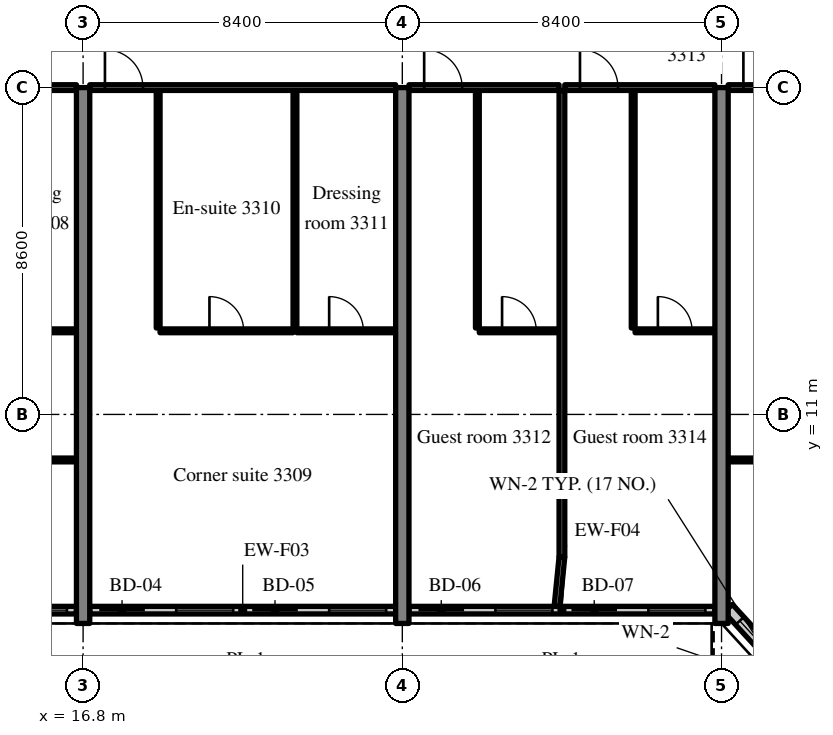
"""IFC4 building model, lengths in metres.
Left out: names, types, materials, properties, quantities, classifications, styles, units other than length and angle.
Written with IfcOpenShell. Run it as: python <this file> out.ifc"""

import sys

from ifc_helpers import new_model, si_unit, direction, frame, frame_2d, origin, place, context, subcontext, project, spatial, rectangle, extrude, source, transform, mapped, element, fill, save


model = new_model("IFC4")
c1 = context("Model", 3, precision=1e-05, world=origin(), true_north=direction((0.0, 1.0)))
c2 = subcontext(c1, "Body", "Model", "MODEL_VIEW")
j1 = project(units=[si_unit("LENGTHUNIT", "METRE"), si_unit("PLANEANGLEUNIT", "RADIAN")], contexts=[c1])
p1 = place(None, origin())
s1 = spatial("IfcSite", under=j1, at=p1, CompositionType="ELEMENT")
p2 = place(p1, origin())
s2 = spatial("IfcBuilding", under=s1, at=p2, CompositionType="ELEMENT")
p3 = place(p2, frame((0.0, 0.0, 137.0)))
s3 = spatial("IfcBuildingStorey", under=s2, at=p3, CompositionType="ELEMENT", Elevation=137.0)
m1 = source(origin(), c2, "Body", "SweptSolid", [
    extrude(rectangle(XDim=14.1, YDim=0.35, at=frame_2d((7.05, 0.0))), origin(), (0.0, 0.0, 1.0), 3.52),
])
for number, where, z_axis, x_axis in (
    (1, (16.8, 5.5, 0.0), (0.0, 0.0, 1.0), (0.0, 1.0, 0.0)),
    (2, (25.2, 5.5, 0.0), (0.0, 0.0, 1.0), (0.0, 1.0, 0.0)),
    (3, (33.6, 5.5, 0.0), (0.0, 0.0, 1.0), (0.0, 1.0, 0.0)),
):
    element("IfcWall", number, at=place(p3, frame(where, z_axis=z_axis, x_axis=x_axis)), inside=s3, PredefinedType="SHEAR", context=c2, shape_type="MappedRepresentation", body=[
        mapped(m1, transform((0.0, 0.0, 0.0), scale=1.0)),
    ])
m2 = source(origin(), c2, "Body", "SweptSolid", [
    extrude(rectangle(XDim=8.05, YDim=0.2, at=frame_2d((4.025, 0.0))), origin(), (0.0, 0.0, 1.0), 2.82),
])
p4 = place(p3, frame((8.575, 5.85, 0.0), z_axis=(0.0, 0.0, 1.0), x_axis=(1.0, 0.0, 0.0)))
e4 = element("IfcWall", 4, at=p4, inside=s3, PredefinedType="SOLIDWALL", context=c2, shape_type="MappedRepresentation", body=[
    mapped(m2, transform((0.0, 0.0, 0.0), scale=1.0)),
])
m3 = source(origin(), c2, "Body", "SweptSolid", [
    extrude(rectangle(XDim=1.2, YDim=2.4, at=frame_2d((0.6, 1.2))), frame((0.0, 0.11, 0.0), z_axis=(0.0, -1.0, 0.0), x_axis=(1.0, 0.0, 0.0)), (0.0, 0.0, 1.0), 0.22),
])
p5 = place(p4, frame((0.25, 0.0, 0.0)))
e5 = element("IfcOpeningElement", 5, at=p5, cuts=e4, PredefinedType="OPENING", context=c2, shape_type="MappedRepresentation", body=[
    mapped(m3, transform((0.0, 0.0, 0.0), scale=1.0)),
])
m4 = source(origin(), c2, "Body", "SweptSolid", [
    extrude(rectangle(XDim=1.5, YDim=1.5, at=frame_2d((0.75, 0.75))), frame((0.0, 0.11, 0.0), z_axis=(0.0, -1.0, 0.0), x_axis=(1.0, 0.0, 0.0)), (0.0, 0.0, 1.0), 0.22),
])
p6 = place(p4, frame((2.275, 0.0, 0.9)))
e6 = element("IfcOpeningElement", 6, at=p6, cuts=e4, PredefinedType="OPENING", context=c2, shape_type="MappedRepresentation", body=[
    mapped(m4, transform((0.0, 0.0, 0.0), scale=1.0)),
])
p7 = place(p4, frame((4.275, 0.0, 0.0)))
e7 = element("IfcOpeningElement", 7, at=p7, cuts=e4, PredefinedType="OPENING", context=c2, shape_type="MappedRepresentation", body=[
    mapped(m3, transform((0.0, 0.0, 0.0), scale=1.0)),
])
p8 = place(p4, frame((6.3, 0.0, 0.9)))
e8 = element("IfcOpeningElement", 8, at=p8, cuts=e4, PredefinedType="OPENING", context=c2, shape_type="MappedRepresentation", body=[
    mapped(m4, transform((0.0, 0.0, 0.0), scale=1.0)),
])
m5 = source(origin(), c2, "Body", "SweptSolid", [
    extrude(rectangle(XDim=8.05, YDim=0.2, at=frame_2d((4.025, 0.0))), origin(), (0.0, 0.0, 1.0), 2.82),
])
p9 = place(p3, frame((16.975, 5.85, 0.0), z_axis=(0.0, 0.0, 1.0), x_axis=(1.0, 0.0, 0.0)))
e9 = element("IfcWall", 9, at=p9, inside=s3, PredefinedType="SOLIDWALL", context=c2, shape_type="MappedRepresentation", body=[
    mapped(m5, transform((0.0, 0.0, 0.0), scale=1.0)),
])
p10 = place(p9, frame((0.25, 0.0, 0.0)))
e10 = element("IfcOpeningElement", 10, at=p10, cuts=e9, PredefinedType="OPENING", context=c2, shape_type="MappedRepresentation", body=[
    mapped(m3, transform((0.0, 0.0, 0.0), scale=1.0)),
])
p11 = place(p9, frame((2.275, 0.0, 0.9)))
e11 = element("IfcOpeningElement", 11, at=p11, cuts=e9, PredefinedType="OPENING", context=c2, shape_type="MappedRepresentation", body=[
    mapped(m4, transform((0.0, 0.0, 0.0), scale=1.0)),
])
p12 = place(p9, frame((4.275, 0.0, 0.0)))
e12 = element("IfcOpeningElement", 12, at=p12, cuts=e9, PredefinedType="OPENING", context=c2, shape_type="MappedRepresentation", body=[
    mapped(m3, transform((0.0, 0.0, 0.0), scale=1.0)),
])
p13 = place(p9, frame((6.3, 0.0, 0.9)))
e13 = element("IfcOpeningElement", 13, at=p13, cuts=e9, PredefinedType="OPENING", context=c2, shape_type="MappedRepresentation", body=[
    mapped(m4, transform((0.0, 0.0, 0.0), scale=1.0)),
])
p14 = place(p3, frame((25.375, 5.85, 0.0), z_axis=(0.0, 0.0, 1.0), x_axis=(1.0, 0.0, 0.0)))
e14 = element("IfcWall", 14, at=p14, inside=s3, PredefinedType="SOLIDWALL", context=c2, shape_type="MappedRepresentation", body=[
    mapped(m2, transform((0.0, 0.0, 0.0), scale=1.0)),
])
p15 = place(p14, frame((0.25, 0.0, 0.0)))
e15 = element("IfcOpeningElement", 15, at=p15, cuts=e14, PredefinedType="OPENING", context=c2, shape_type="MappedRepresentation", body=[
    mapped(m3, transform((0.0, 0.0, 0.0), scale=1.0)),
])
p16 = place(p14, frame((2.275, 0.0, 0.9)))
e16 = element("IfcOpeningElement", 16, at=p16, cuts=e14, PredefinedType="OPENING", context=c2, shape_type="MappedRepresentation", body=[
    mapped(m4, transform((0.0, 0.0, 0.0), scale=1.0)),
])
p17 = place(p14, frame((4.275, 0.0, 0.0)))
e17 = element("IfcOpeningElement", 17, at=p17, cuts=e14, PredefinedType="OPENING", context=c2, shape_type="MappedRepresentation", body=[
    mapped(m3, transform((0.0, 0.0, 0.0), scale=1.0)),
])
p18 = place(p14, frame((6.3, 0.0, 0.9)))
e18 = element("IfcOpeningElement", 18, at=p18, cuts=e14, PredefinedType="OPENING", context=c2, shape_type="MappedRepresentation", body=[
    mapped(m4, transform((0.0, 0.0, 0.0), scale=1.0)),
])
m6 = source(origin(), c2, "Body", "SweptSolid", [
    extrude(rectangle(XDim=2.398, YDim=0.3, at=frame_2d((1.199, 0.0))), origin(), (0.0, 0.0, 1.0), 3.52),
])
p19 = place(p3, frame((33.776, 5.9, 0.0), z_axis=(0.0, 0.0, 1.0), x_axis=(0.675374189419, -0.737475222815, 0.0)))
e19 = element("IfcWall", 19, at=p19, inside=s3, PredefinedType="SOLIDWALL", context=c2, shape_type="MappedRepresentation", body=[
    mapped(m6, transform((0.0, 0.0, 0.0), scale=1.0)),
])
m7 = source(origin(), c2, "Body", "SweptSolid", [
    extrude(rectangle(XDim=1.5, YDim=2.0, at=frame_2d((0.75, 1.0))), frame((0.0, 0.16, 0.0), z_axis=(0.0, -1.0, 0.0), x_axis=(1.0, 0.0, 0.0)), (0.0, 0.0, 1.0), 0.32),
])
p20 = place(p19, frame((0.449, 0.0, 0.9)))
e20 = element("IfcOpeningElement", 20, at=p20, cuts=e19, PredefinedType="OPENING", context=c2, shape_type="MappedRepresentation", body=[
    mapped(m7, transform((0.0, 0.0, 0.0), scale=1.0)),
])
m8 = source(origin(), c2, "Body", "SweptSolid", [
    extrude(rectangle(XDim=2.6, YDim=0.1, at=frame_2d((1.3, 0.0))), origin(), (0.0, 0.0, 1.0), 3.52),
])
p21 = place(p3, frame((14.025, 13.2, 0.0), z_axis=(0.0, 0.0, 1.0), x_axis=(1.0, 0.0, 0.0)))
e21 = element("IfcWall", 21, at=p21, inside=s3, PredefinedType="PARTITIONING", context=c2, shape_type="MappedRepresentation", body=[
    mapped(m8, transform((0.0, 0.0, 0.0), scale=1.0)),
])
m9 = source(origin(), c2, "Body", "SweptSolid", [
    extrude(rectangle(XDim=0.9, YDim=2.1, at=frame_2d((0.45, 1.05))), frame((0.0, 0.06, 0.0), z_axis=(0.0, -1.0, 0.0), x_axis=(1.0, 0.0, 0.0)), (0.0, 0.0, 1.0), 0.12),
])
p22 = place(p21, frame((0.85, 0.0, 0.0)))
e22 = element("IfcOpeningElement", 22, at=p22, cuts=e21, PredefinedType="OPENING", context=c2, shape_type="MappedRepresentation", body=[
    mapped(m9, transform((0.0, 0.0, 0.0), scale=1.0)),
])
m10 = source(origin(), c2, "Body", "SweptSolid", [
    extrude(rectangle(XDim=8.05, YDim=0.1, at=frame_2d((4.025, 0.0))), origin(), (0.0, 0.0, 1.0), 3.52),
])
p23 = place(p3, frame((8.575, 9.802, 0.0), z_axis=(0.0, 0.0, 1.0), x_axis=(1.0, 0.0, 0.0)))
e23 = element("IfcWall", 23, at=p23, inside=s3, PredefinedType="PARTITIONING", context=c2, shape_type="MappedRepresentation", body=[
    mapped(m10, transform((0.0, 0.0, 0.0), scale=1.0)),
])
m11 = source(origin(), c2, "Body", "SweptSolid", [
    extrude(rectangle(XDim=1.8, YDim=2.1, at=frame_2d((0.9, 1.05))), frame((0.0, 0.06, 0.0), z_axis=(0.0, -1.0, 0.0), x_axis=(1.0, 0.0, 0.0)), (0.0, 0.0, 1.0), 0.12),
])
p24 = place(p23, frame((3.125, 0.0, 0.0)))
e24 = element("IfcOpeningElement", 24, at=p24, cuts=e23, PredefinedType="OPENING", context=c2, shape_type="MappedRepresentation", body=[
    mapped(m11, transform((0.0, 0.0, 0.0), scale=1.0)),
])
m12 = source(origin(), c2, "Body", "SweptSolid", [
    extrude(rectangle(XDim=8.05, YDim=0.15, at=frame_2d((4.025, 0.0))), origin(), (0.0, 0.0, 1.0), 2.82),
])
p25 = place(p3, frame((8.575, 19.6, 0.0), z_axis=(0.0, 0.0, 1.0), x_axis=(1.0, 0.0, 0.0)))
e25 = element("IfcWall", 25, at=p25, inside=s3, PredefinedType="PARTITIONING", context=c2, shape_type="MappedRepresentation", body=[
    mapped(m12, transform((0.0, 0.0, 0.0), scale=1.0)),
])
m13 = source(origin(), c2, "Body", "SweptSolid", [
    extrude(rectangle(XDim=1.0, YDim=2.1, at=frame_2d((0.5, 1.05))), frame((0.0, 0.085, 0.0), z_axis=(0.0, -1.0, 0.0), x_axis=(1.0, 0.0, 0.0)), (0.0, 0.0, 1.0), 0.17),
])
p26 = place(p25, frame((0.4, 0.0, 0.0)))
e26 = element("IfcOpeningElement", 26, at=p26, cuts=e25, PredefinedType="OPENING", context=c2, shape_type="MappedRepresentation", body=[
    mapped(m13, transform((0.0, 0.0, 0.0), scale=1.0)),
])
m14 = source(origin(), c2, "Body", "SweptSolid", [
    extrude(rectangle(XDim=6.25, YDim=0.1, at=frame_2d((3.125, 0.0))), origin(), (0.0, 0.0, 1.0), 3.52),
])
for number, where, z_axis, x_axis in (
    (27, (18.775, 13.275, 0.0), (0.0, 0.0, 1.0), (0.0, 1.0, 0.0)),
    (28, (22.375, 13.275, 0.0), (0.0, 0.0, 1.0), (0.0, 1.0, 0.0)),
):
    element("IfcWall", number, at=place(p3, frame(where, z_axis=z_axis, x_axis=x_axis)), inside=s3, PredefinedType="PARTITIONING", context=c2, shape_type="MappedRepresentation", body=[
        mapped(m14, transform((0.0, 0.0, 0.0), scale=1.0)),
    ])
m15 = source(origin(), c2, "Body", "SweptSolid", [
    extrude(rectangle(XDim=3.5, YDim=0.1, at=frame_2d((1.75, 0.0))), origin(), (0.0, 0.0, 1.0), 3.52),
])
p27 = place(p3, frame((18.825, 13.2, 0.0), z_axis=(0.0, 0.0, 1.0), x_axis=(1.0, 0.0, 0.0)))
e29 = element("IfcWall", 29, at=p27, inside=s3, PredefinedType="PARTITIONING", context=c2, shape_type="MappedRepresentation", body=[
    mapped(m15, transform((0.0, 0.0, 0.0), scale=1.0)),
])
p28 = place(p27, frame((1.3, 0.0, 0.0)))
e30 = element("IfcOpeningElement", 30, at=p28, cuts=e29, PredefinedType="OPENING", context=c2, shape_type="MappedRepresentation", body=[
    mapped(m9, transform((0.0, 0.0, 0.0), scale=1.0)),
])
m16 = source(origin(), c2, "Body", "SweptSolid", [
    extrude(rectangle(XDim=2.6, YDim=0.1, at=frame_2d((1.3, 0.0))), origin(), (0.0, 0.0, 1.0), 3.52),
])
p29 = place(p3, frame((22.425, 13.2, 0.0), z_axis=(0.0, 0.0, 1.0), x_axis=(1.0, 0.0, 0.0)))
e31 = element("IfcWall", 31, at=p29, inside=s3, PredefinedType="PARTITIONING", context=c2, shape_type="MappedRepresentation", body=[
    mapped(m16, transform((0.0, 0.0, 0.0), scale=1.0)),
])
p30 = place(p29, frame((0.85, 0.0, 0.0)))
e32 = element("IfcOpeningElement", 32, at=p30, cuts=e31, PredefinedType="OPENING", context=c2, shape_type="MappedRepresentation", body=[
    mapped(m9, transform((0.0, 0.0, 0.0), scale=1.0)),
])
m17 = source(origin(), c2, "Body", "SweptSolid", [
    extrude(rectangle(XDim=8.05, YDim=0.15, at=frame_2d((4.025, 0.0))), origin(), (0.0, 0.0, 1.0), 2.82),
])
p31 = place(p3, frame((16.975, 19.6, 0.0), z_axis=(0.0, 0.0, 1.0), x_axis=(1.0, 0.0, 0.0)))
e33 = element("IfcWall", 33, at=p31, inside=s3, PredefinedType="PARTITIONING", context=c2, shape_type="MappedRepresentation", body=[
    mapped(m17, transform((0.0, 0.0, 0.0), scale=1.0)),
])
p32 = place(p31, frame((0.4, 0.0, 0.0)))
e34 = element("IfcOpeningElement", 34, at=p32, cuts=e33, PredefinedType="OPENING", context=c2, shape_type="MappedRepresentation", body=[
    mapped(m13, transform((0.0, 0.0, 0.0), scale=1.0)),
])
p33 = place(p3, frame((27.175, 13.275, 0.0), z_axis=(0.0, 0.0, 1.0), x_axis=(0.0, 1.0, 0.0)))
e35 = element("IfcWall", 35, at=p33, inside=s3, PredefinedType="PARTITIONING", context=c2, shape_type="MappedRepresentation", body=[
    mapped(m14, transform((0.0, 0.0, 0.0), scale=1.0)),
])
m18 = source(origin(), c2, "Body", "SweptSolid", [
    extrude(rectangle(XDim=2.1, YDim=0.1, at=frame_2d((1.05, 0.0))), origin(), (0.0, 0.0, 1.0), 3.52),
])
p34 = place(p3, frame((27.225, 13.2, 0.0), z_axis=(0.0, 0.0, 1.0), x_axis=(1.0, 0.0, 0.0)))
e36 = element("IfcWall", 36, at=p34, inside=s3, PredefinedType="PARTITIONING", context=c2, shape_type="MappedRepresentation", body=[
    mapped(m18, transform((0.0, 0.0, 0.0), scale=1.0)),
])
p35 = place(p34, frame((0.6, 0.0, 0.0)))
e37 = element("IfcOpeningElement", 37, at=p35, cuts=e36, PredefinedType="OPENING", context=c2, shape_type="MappedRepresentation", body=[
    mapped(m9, transform((0.0, 0.0, 0.0), scale=1.0)),
])
m19 = source(origin(), c2, "Body", "SweptSolid", [
    extrude(rectangle(XDim=3.95, YDim=0.15, at=frame_2d((1.975, 0.0))), origin(), (0.0, 0.0, 1.0), 2.82),
])
p36 = place(p3, frame((25.375, 19.6, 0.0), z_axis=(0.0, 0.0, 1.0), x_axis=(1.0, 0.0, 0.0)))
e38 = element("IfcWall", 38, at=p36, inside=s3, PredefinedType="PARTITIONING", context=c2, shape_type="MappedRepresentation", body=[
    mapped(m19, transform((0.0, 0.0, 0.0), scale=1.0)),
])
p37 = place(p36, frame((0.4, 0.0, 0.0)))
e39 = element("IfcOpeningElement", 39, at=p37, cuts=e38, PredefinedType="OPENING", context=c2, shape_type="MappedRepresentation", body=[
    mapped(m13, transform((0.0, 0.0, 0.0), scale=1.0)),
])
p38 = place(p3, frame((31.275, 13.275, 0.0), z_axis=(0.0, 0.0, 1.0), x_axis=(0.0, 1.0, 0.0)))
e40 = element("IfcWall", 40, at=p38, inside=s3, PredefinedType="PARTITIONING", context=c2, shape_type="MappedRepresentation", body=[
    mapped(m14, transform((0.0, 0.0, 0.0), scale=1.0)),
])
m20 = source(origin(), c2, "Body", "SweptSolid", [
    extrude(rectangle(XDim=2.1, YDim=0.1, at=frame_2d((1.05, 0.0))), origin(), (0.0, 0.0, 1.0), 3.52),
])
p39 = place(p3, frame((31.325, 13.2, 0.0), z_axis=(0.0, 0.0, 1.0), x_axis=(1.0, 0.0, 0.0)))
e41 = element("IfcWall", 41, at=p39, inside=s3, PredefinedType="PARTITIONING", context=c2, shape_type="MappedRepresentation", body=[
    mapped(m20, transform((0.0, 0.0, 0.0), scale=1.0)),
])
p40 = place(p39, frame((0.6, 0.0, 0.0)))
e42 = element("IfcOpeningElement", 42, at=p40, cuts=e41, PredefinedType="OPENING", context=c2, shape_type="MappedRepresentation", body=[
    mapped(m9, transform((0.0, 0.0, 0.0), scale=1.0)),
])
p41 = place(p3, frame((29.475, 19.6, 0.0), z_axis=(0.0, 0.0, 1.0), x_axis=(1.0, 0.0, 0.0)))
e43 = element("IfcWall", 43, at=p41, inside=s3, PredefinedType="PARTITIONING", context=c2, shape_type="MappedRepresentation", body=[
    mapped(m19, transform((0.0, 0.0, 0.0), scale=1.0)),
])
p42 = place(p41, frame((0.4, 0.0, 0.0)))
e44 = element("IfcOpeningElement", 44, at=p42, cuts=e43, PredefinedType="OPENING", context=c2, shape_type="MappedRepresentation", body=[
    mapped(m13, transform((0.0, 0.0, 0.0), scale=1.0)),
])
m21 = source(origin(), c2, "Body", "SweptSolid", [
    extrude(rectangle(XDim=12.275, YDim=0.15, at=frame_2d((6.137, 0.0))), origin(), (0.0, 0.0, 1.0), 3.52),
])
p43 = place(p3, frame((29.4, 7.25, 0.0), z_axis=(0.0, 0.0, 1.0), x_axis=(0.0, 1.0, 0.0)))
e45 = element("IfcWall", 45, at=p43, inside=s3, PredefinedType="PARTITIONING", context=c2, shape_type="MappedRepresentation", body=[
    mapped(m21, transform((0.0, 0.0, 0.0), scale=1.0)),
])
p44 = place(p3, frame((33.775, 9.802, 0.0), z_axis=(0.0, 0.0, 1.0), x_axis=(1.0, 0.0, 0.0)))
e46 = element("IfcWall", 46, at=p44, inside=s3, PredefinedType="PARTITIONING", context=c2, shape_type="MappedRepresentation", body=[
    mapped(m10, transform((0.0, 0.0, 0.0), scale=1.0)),
])
p45 = place(p44, frame((3.125, 0.0, 0.0)))
e47 = element("IfcOpeningElement", 47, at=p45, cuts=e46, PredefinedType="OPENING", context=c2, shape_type="MappedRepresentation", body=[
    mapped(m11, transform((0.0, 0.0, 0.0), scale=1.0)),
])
p46 = place(p3, frame((33.775, 19.6, 0.0), z_axis=(0.0, 0.0, 1.0), x_axis=(1.0, 0.0, 0.0)))
e48 = element("IfcWall", 48, at=p46, inside=s3, PredefinedType="PARTITIONING", context=c2, shape_type="MappedRepresentation", body=[
    mapped(m12, transform((0.0, 0.0, 0.0), scale=1.0)),
])
p47 = place(p46, frame((0.4, 0.0, 0.0)))
e49 = element("IfcOpeningElement", 49, at=p47, cuts=e48, PredefinedType="OPENING", context=c2, shape_type="MappedRepresentation", body=[
    mapped(m13, transform((0.0, 0.0, 0.0), scale=1.0)),
])
m22 = source(origin(), c2, "Body", "SweptSolid", [
    extrude(rectangle(XDim=1.307, YDim=0.15, at=frame_2d((0.653, 0.0))), origin(), (0.0, 0.0, 1.0), 3.52),
])
p48 = place(p3, frame((29.27, 5.95, 0.0), z_axis=(0.0, 0.0, 1.0), x_axis=(0.099411212066, 0.995046436562, 0.0)))
e50 = element("IfcWall", 50, at=p48, inside=s3, PredefinedType="PARTITIONING", context=c2, shape_type="MappedRepresentation", body=[
    mapped(m22, transform((0.0, 0.0, 0.0), scale=1.0)),
])
m23 = source(origin(), c2, "Body", "SweptSolid", [
    extrude(rectangle(XDim=1.5, YDim=1.5, at=frame_2d((0.75, 0.75))), frame((0.0, 0.03, 0.0), z_axis=(0.0, -1.0, 0.0), x_axis=(1.0, 0.0, 0.0)), (0.0, 0.0, 1.0), 0.06),
])
p49 = place(p8, origin())
e51 = element("IfcWindow", 51, at=p49, inside=s3, PartitioningType="SINGLE_PANEL", PredefinedType="WINDOW", context=c2, shape_type="MappedRepresentation", body=[
    mapped(m23, transform((0.0, 0.0, 0.0), scale=1.0)),
])
fill(e8, e51)
m24 = source(origin(), c2, "Body", "SweptSolid", [
    extrude(rectangle(XDim=1.2, YDim=2.4, at=frame_2d((0.6, 1.2))), frame((0.0, 0.025, 0.0), z_axis=(0.0, -1.0, 0.0), x_axis=(1.0, 0.0, 0.0)), (0.0, 0.0, 1.0), 0.05),
])
p50 = place(p10, origin())
e52 = element("IfcDoor", 52, at=p50, inside=s3, OperationType="SLIDING_TO_RIGHT", PredefinedType="DOOR", context=c2, shape_type="MappedRepresentation", body=[
    mapped(m24, transform((0.0, 0.0, 0.0), scale=1.0)),
])
fill(e10, e52)
p51 = place(p11, origin())
e53 = element("IfcWindow", 53, at=p51, inside=s3, PartitioningType="SINGLE_PANEL", PredefinedType="WINDOW", context=c2, shape_type="MappedRepresentation", body=[
    mapped(m23, transform((0.0, 0.0, 0.0), scale=1.0)),
])
fill(e11, e53)
p52 = place(p12, origin())
e54 = element("IfcDoor", 54, at=p52, inside=s3, OperationType="SLIDING_TO_LEFT", PredefinedType="DOOR", context=c2, shape_type="MappedRepresentation", body=[
    mapped(m24, transform((0.0, 0.0, 0.0), scale=1.0)),
])
fill(e12, e54)
p53 = place(p13, origin())
e55 = element("IfcWindow", 55, at=p53, inside=s3, PartitioningType="SINGLE_PANEL", PredefinedType="WINDOW", context=c2, shape_type="MappedRepresentation", body=[
    mapped(m23, transform((0.0, 0.0, 0.0), scale=1.0)),
])
fill(e13, e55)
p54 = place(p15, origin())
e56 = element("IfcDoor", 56, at=p54, inside=s3, OperationType="SLIDING_TO_RIGHT", PredefinedType="DOOR", context=c2, shape_type="MappedRepresentation", body=[
    mapped(m24, transform((0.0, 0.0, 0.0), scale=1.0)),
])
fill(e15, e56)
p55 = place(p16, origin())
e57 = element("IfcWindow", 57, at=p55, inside=s3, PartitioningType="SINGLE_PANEL", PredefinedType="WINDOW", context=c2, shape_type="MappedRepresentation", body=[
    mapped(m23, transform((0.0, 0.0, 0.0), scale=1.0)),
])
fill(e16, e57)
p56 = place(p17, origin())
e58 = element("IfcDoor", 58, at=p56, inside=s3, OperationType="SLIDING_TO_LEFT", PredefinedType="DOOR", context=c2, shape_type="MappedRepresentation", body=[
    mapped(m24, transform((0.0, 0.0, 0.0), scale=1.0)),
])
fill(e17, e58)
p57 = place(p18, origin())
e59 = element("IfcWindow", 59, at=p57, inside=s3, PartitioningType="SINGLE_PANEL", PredefinedType="WINDOW", context=c2, shape_type="MappedRepresentation", body=[
    mapped(m23, transform((0.0, 0.0, 0.0), scale=1.0)),
])
fill(e18, e59)
m25 = source(origin(), c2, "Body", "SweptSolid", [
    extrude(rectangle(XDim=1.5, YDim=2.0, at=frame_2d((0.75, 1.0))), frame((0.0, 0.03, 0.0), z_axis=(0.0, -1.0, 0.0), x_axis=(1.0, 0.0, 0.0)), (0.0, 0.0, 1.0), 0.06),
])
p58 = place(p20, origin())
e60 = element("IfcWindow", 60, at=p58, inside=s3, PartitioningType="SINGLE_PANEL", PredefinedType="WINDOW", context=c2, shape_type="MappedRepresentation", body=[
    mapped(m25, transform((0.0, 0.0, 0.0), scale=1.0)),
])
fill(e20, e60)
m26 = source(origin(), c2, "Body", "SweptSolid", [
    extrude(rectangle(XDim=0.9, YDim=2.1, at=frame_2d((0.45, 1.05))), frame((0.0, 0.025, 0.0), z_axis=(0.0, -1.0, 0.0), x_axis=(1.0, 0.0, 0.0)), (0.0, 0.0, 1.0), 0.05),
])
p59 = place(p28, origin())
e61 = element("IfcDoor", 61, at=p59, inside=s3, OperationType="SINGLE_SWING_LEFT", PredefinedType="DOOR", context=c2, shape_type="MappedRepresentation", body=[
    mapped(m26, transform((0.0, 0.0, 0.0), scale=1.0)),
])
fill(e30, e61)
p60 = place(p30, origin())
e62 = element("IfcDoor", 62, at=p60, inside=s3, OperationType="SINGLE_SWING_LEFT", PredefinedType="DOOR", context=c2, shape_type="MappedRepresentation", body=[
    mapped(m26, transform((0.0, 0.0, 0.0), scale=1.0)),
])
fill(e32, e62)
m27 = source(origin(), c2, "Body", "SweptSolid", [
    extrude(rectangle(XDim=1.0, YDim=2.1, at=frame_2d((0.5, 1.05))), frame((0.0, 0.025, 0.0), z_axis=(0.0, -1.0, 0.0), x_axis=(1.0, 0.0, 0.0)), (0.0, 0.0, 1.0), 0.05),
])
p61 = place(p32, origin())
e63 = element("IfcDoor", 63, at=p61, inside=s3, OperationType="SINGLE_SWING_LEFT", PredefinedType="DOOR", context=c2, shape_type="MappedRepresentation", body=[
    mapped(m27, transform((0.0, 0.0, 0.0), scale=1.0)),
])
fill(e34, e63)
p62 = place(p35, origin())
e64 = element("IfcDoor", 64, at=p62, inside=s3, OperationType="SINGLE_SWING_LEFT", PredefinedType="DOOR", context=c2, shape_type="MappedRepresentation", body=[
    mapped(m26, transform((0.0, 0.0, 0.0), scale=1.0)),
])
fill(e37, e64)
p63 = place(p37, origin())
e65 = element("IfcDoor", 65, at=p63, inside=s3, OperationType="SINGLE_SWING_LEFT", PredefinedType="DOOR", context=c2, shape_type="MappedRepresentation", body=[
    mapped(m27, transform((0.0, 0.0, 0.0), scale=1.0)),
])
fill(e39, e65)
p64 = place(p40, origin())
e66 = element("IfcDoor", 66, at=p64, inside=s3, OperationType="SINGLE_SWING_LEFT", PredefinedType="DOOR", context=c2, shape_type="MappedRepresentation", body=[
    mapped(m26, transform((0.0, 0.0, 0.0), scale=1.0)),
])
fill(e42, e66)
p65 = place(p42, origin())
e67 = element("IfcDoor", 67, at=p65, inside=s3, OperationType="SINGLE_SWING_LEFT", PredefinedType="DOOR", context=c2, shape_type="MappedRepresentation", body=[
    mapped(m27, transform((0.0, 0.0, 0.0), scale=1.0)),
])
fill(e44, e67)
p66 = place(p47, origin())
e68 = element("IfcDoor", 68, at=p66, inside=s3, OperationType="SINGLE_SWING_LEFT", PredefinedType="DOOR", context=c2, shape_type="MappedRepresentation", body=[
    mapped(m27, transform((0.0, 0.0, 0.0), scale=1.0)),
])
fill(e49, e68)
save(model, sys.argv[1])
